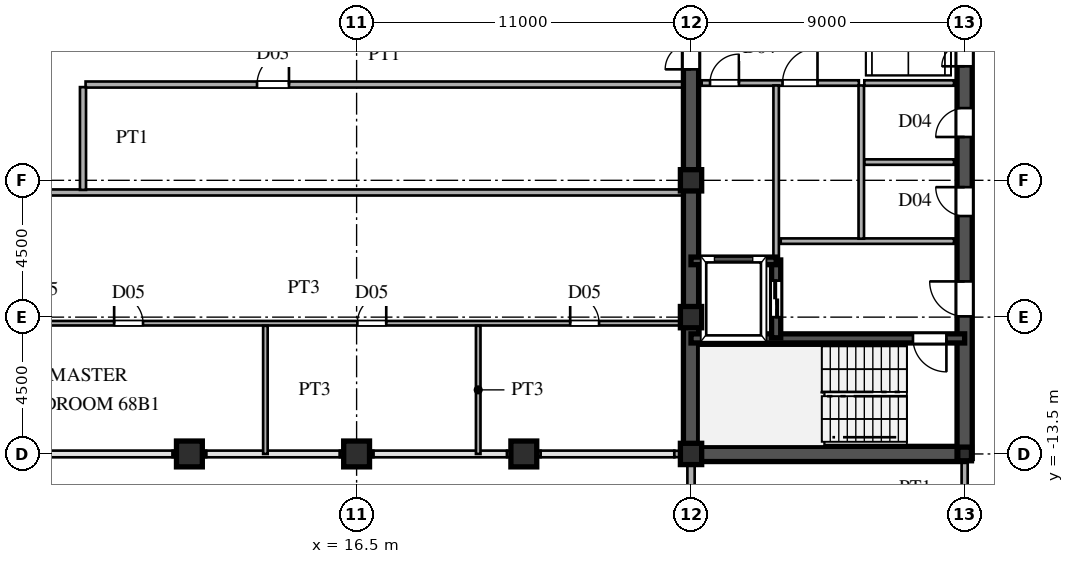
"""IFC4 building model, lengths in metres.
Left out: names, types, materials, properties, quantities, classifications, styles, units other than length and angle.
Written with IfcOpenShell. Run it as: python <this file> out.ifc"""

import sys

from ifc_helpers import new_model, si_unit, direction, frame, frame_2d, origin, origin_2d, place, context, subcontext, project, spatial, rectangle, hollow_rectangle, i_section, extrude, source, transform, mapped, element, fill, save


model = new_model("IFC4")
c1 = context("Model", 3, precision=1e-05, world=origin(), true_north=direction((0.0, 1.0)))
c2 = subcontext(c1, "Body", "Model", "MODEL_VIEW")
j1 = project(units=[si_unit("LENGTHUNIT", "METRE"), si_unit("PLANEANGLEUNIT", "RADIAN")], contexts=[c1])
p1 = place(None, origin())
s1 = spatial("IfcSite", under=j1, at=p1, CompositionType="ELEMENT")
p2 = place(p1, origin())
s2 = spatial("IfcBuilding", under=s1, at=p2, CompositionType="ELEMENT")
p3 = place(p2, frame((0.0, 0.0, 258.15)))
s3 = spatial("IfcBuildingStorey", under=s2, at=p3, CompositionType="ELEMENT", Elevation=258.15)
m1 = source(origin(), c2, "Body", "SweptSolid", [
    extrude(hollow_rectangle(XDim=0.7, YDim=0.7, WallThickness=0.03, at=origin_2d()), origin(), (0.0, 0.0, 1.0), 3.75),
])
for number, where, z_axis, x_axis in (
    (1, (27.5, -13.5, 0.0), (0.0, 0.0, 1.0), (1.0, 0.0, 0.0)),
    (2, (27.5, -9.0, 0.0), (0.0, 0.0, 1.0), (1.0, 0.0, 0.0)),
    (3, (27.5, -4.5, 0.0), (0.0, 0.0, 1.0), (1.0, 0.0, 0.0)),
):
    element("IfcColumn", number, at=place(p3, frame(where, z_axis=z_axis, x_axis=x_axis)), inside=s3, PredefinedType="COLUMN", context=c2, shape_type="MappedRepresentation", body=[
        mapped(m1, transform((0.0, 0.0, 0.0), scale=1.0)),
    ])
m2 = source(origin(), c2, "Body", "SweptSolid", [
    extrude(i_section(OverallWidth=0.45, OverallDepth=0.45, WebThickness=0.016, FlangeThickness=0.025, at=origin_2d()), origin(), (0.0, 0.0, 1.0), 3.75),
])
p4 = place(p3, frame((36.5, -13.5, 0.0), z_axis=(0.0, 0.0, 1.0), x_axis=(1.0, 0.0, 0.0)))
e4 = element("IfcColumn", 4, at=p4, inside=s3, PredefinedType="COLUMN", context=c2, shape_type="MappedRepresentation", body=[
    mapped(m2, transform((0.0, 0.0, 0.0), scale=1.0)),
])
m3 = source(origin(), c2, "Body", "SweptSolid", [
    extrude(hollow_rectangle(XDim=0.85, YDim=0.85, WallThickness=0.036, at=origin_2d()), origin(), (0.0, 0.0, 1.0), 3.75),
])
for number, where, z_axis, x_axis in (
    (5, (11.0, -13.5, 0.0), (0.0, 0.0, 1.0), (1.0, 0.0, 0.0)),
    (6, (16.5, -13.5, 0.0), (0.0, 0.0, 1.0), (1.0, 0.0, 0.0)),
    (7, (22.0, -13.5, 0.0), (0.0, 0.0, 1.0), (1.0, 0.0, 0.0)),
):
    element("IfcColumn", number, at=place(p3, frame(where, z_axis=z_axis, x_axis=x_axis)), inside=s3, PredefinedType="COLUMN", context=c2, shape_type="MappedRepresentation", body=[
        mapped(m3, transform((0.0, 0.0, 0.0), scale=1.0)),
    ])
p5 = place(p3, frame((27.5, -15.98, 0.0), z_axis=(0.0, 0.0, 1.0), x_axis=(0.0, 1.0, 0.0)))
e8 = element("IfcWall", 8, at=p5, inside=s3, PredefinedType="SOLIDWALL", context=c2, shape_type="SweptSolid", body=[
    extrude(rectangle(XDim=1.605, YDim=0.24, at=frame_2d((0.803, 0.0))), origin(), (0.0, 0.0, 1.0), 3.53),
])
p6 = place(p3, frame((27.5, -14.375, 0.0), z_axis=(0.0, 0.0, 1.0), x_axis=(0.0, 1.0, 0.0)))
e9 = element("IfcWall", 9, at=p6, inside=s3, PredefinedType="SOLIDWALL", context=c2, shape_type="SweptSolid", body=[
    extrude(rectangle(XDim=0.62, YDim=0.24, at=frame_2d((0.31, 0.0))), origin(), (0.0, 0.0, 1.0), 3.03),
])
for number, where, z_axis, x_axis in (
    (10, (10.45, -13.5, 0.0), (0.0, 0.0, 1.0), (1.0, 0.0, 0.0)),
    (11, (15.95, -13.5, 0.0), (0.0, 0.0, 1.0), (1.0, 0.0, 0.0)),
    (12, (21.45, -13.5, 0.0), (0.0, 0.0, 1.0), (1.0, 0.0, 0.0)),
):
    element("IfcWall", number, at=place(p3, frame(where, z_axis=z_axis, x_axis=x_axis)), inside=s3, PredefinedType="SOLIDWALL", context=c2, shape_type="SweptSolid", body=[
        extrude(rectangle(XDim=1.1, YDim=0.21, at=frame_2d((0.55, 0.0))), origin(), (0.0, 0.0, 1.0), 3.03),
    ])
p7 = place(p3, frame((26.95, -13.5, 0.0), z_axis=(0.0, 0.0, 1.0), x_axis=(1.0, 0.0, 0.0)))
e13 = element("IfcWall", 13, at=p7, inside=s3, PredefinedType="SOLIDWALL", context=c2, shape_type="SweptSolid", body=[
    extrude(rectangle(XDim=0.54, YDim=0.21, at=frame_2d((0.27, 0.0))), origin(), (0.0, 0.0, 1.0), 3.03),
])
p8 = place(p3, frame((27.5, -13.5, 0.0), z_axis=(0.0, 0.0, 1.0), x_axis=(0.0, 1.0, 0.0)))
e14 = element("IfcWall", 14, at=p8, inside=s3, PredefinedType="SHEAR", context=c2, shape_type="SweptSolid", body=[
    extrude(rectangle(XDim=12.2, YDim=0.5, at=frame_2d((6.1, 0.0))), origin(), (0.0, 0.0, 1.0), 3.53),
])
p9 = place(p3, frame((27.5, -1.3, 0.0), z_axis=(0.0, 0.0, 1.0), x_axis=(0.0, 1.0, 0.0)))
e15 = element("IfcWall", 15, at=p9, inside=s3, PredefinedType="SHEAR", context=c2, shape_type="SweptSolid", body=[
    extrude(rectangle(XDim=2.6, YDim=0.5, at=frame_2d((1.3, 0.0))), origin(), (0.0, 0.0, 1.0), 3.53),
])
p10 = place(p9, frame((0.45, 0.0, 0.0)))
e16 = element("IfcOpeningElement", 16, at=p10, cuts=e15, PredefinedType="OPENING", context=c2, shape_type="SweptSolid", body=[
    extrude(rectangle(XDim=1.7, YDim=2.35, at=frame_2d((0.85, 1.175))), frame((0.0, 0.26, 0.0), z_axis=(0.0, -1.0, 0.0), x_axis=(1.0, 0.0, 0.0)), (0.0, 0.0, 1.0), 0.52),
])
p11 = place(p3, frame((27.5, -13.5, 0.0), z_axis=(0.0, 0.0, 1.0), x_axis=(1.0, 0.0, 0.0)))
e17 = element("IfcWall", 17, at=p11, inside=s3, PredefinedType="SHEAR", context=c2, shape_type="SweptSolid", body=[
    extrude(rectangle(XDim=9.0, YDim=0.5, at=frame_2d((4.5, 0.0))), origin(), (0.0, 0.0, 1.0), 3.53),
])
p12 = place(p3, frame((36.5, -13.65, 0.0), z_axis=(0.0, 0.0, 1.0), x_axis=(0.0, 1.0, 0.0)))
e18 = element("IfcWall", 18, at=p12, inside=s3, PredefinedType="SHEAR", context=c2, shape_type="SweptSolid", body=[
    extrude(rectangle(XDim=7.15, YDim=0.5, at=frame_2d((3.575, 0.0))), origin(), (0.0, 0.0, 1.0), 3.53),
])
p13 = place(p12, frame((4.675, 0.0, 0.0)))
e19 = element("IfcOpeningElement", 19, at=p13, cuts=e18, PredefinedType="OPENING", context=c2, shape_type="SweptSolid", body=[
    extrude(rectangle(XDim=1.15, YDim=2.2, at=frame_2d((0.575, 1.1))), frame((0.0, 0.26, 0.0), z_axis=(0.0, -1.0, 0.0), x_axis=(1.0, 0.0, 0.0)), (0.0, 0.0, 1.0), 0.52),
])
p14 = place(p3, frame((36.5, -1.3, 0.0), z_axis=(0.0, 0.0, 1.0), x_axis=(0.0, 1.0, 0.0)))
e20 = element("IfcWall", 20, at=p14, inside=s3, PredefinedType="SHEAR", context=c2, shape_type="SweptSolid", body=[
    extrude(rectangle(XDim=2.6, YDim=0.5, at=frame_2d((1.3, 0.0))), origin(), (0.0, 0.0, 1.0), 3.53),
])
p15 = place(p14, frame((0.55, 0.0, 0.0)))
e21 = element("IfcOpeningElement", 21, at=p15, cuts=e20, PredefinedType="OPENING", context=c2, shape_type="SweptSolid", body=[
    extrude(rectangle(XDim=1.5, YDim=2.3, at=frame_2d((0.75, 1.15))), frame((0.0, 0.26, 0.0), z_axis=(0.0, -1.0, 0.0), x_axis=(1.0, 0.0, 0.0)), (0.0, 0.0, 1.0), 0.52),
])
p16 = place(p3, frame((36.5, -6.5, 0.0), z_axis=(0.0, 0.0, 1.0), x_axis=(0.0, 1.0, 0.0)))
e22 = element("IfcWall", 22, at=p16, inside=s3, PredefinedType="SHEAR", context=c2, shape_type="SweptSolid", body=[
    extrude(rectangle(XDim=2.6, YDim=0.5, at=frame_2d((1.3, 0.0))), origin(), (0.0, 0.0, 1.0), 3.53),
])
p17 = place(p16, frame((0.825, 0.0, 0.0)))
e23 = element("IfcOpeningElement", 23, at=p17, cuts=e22, PredefinedType="OPENING", context=c2, shape_type="SweptSolid", body=[
    extrude(rectangle(XDim=0.95, YDim=2.15, at=frame_2d((0.475, 1.075))), frame((0.0, 0.26, 0.0), z_axis=(0.0, -1.0, 0.0), x_axis=(1.0, 0.0, 0.0)), (0.0, 0.0, 1.0), 0.52),
])
p18 = place(p3, frame((36.5, -3.9, 0.0), z_axis=(0.0, 0.0, 1.0), x_axis=(0.0, 1.0, 0.0)))
e24 = element("IfcWall", 24, at=p18, inside=s3, PredefinedType="SHEAR", context=c2, shape_type="SweptSolid", body=[
    extrude(rectangle(XDim=2.6, YDim=0.5, at=frame_2d((1.3, 0.0))), origin(), (0.0, 0.0, 1.0), 3.53),
])
p19 = place(p18, frame((0.825, 0.0, 0.0)))
e25 = element("IfcOpeningElement", 25, at=p19, cuts=e24, PredefinedType="OPENING", context=c2, shape_type="SweptSolid", body=[
    extrude(rectangle(XDim=0.95, YDim=2.15, at=frame_2d((0.475, 1.075))), frame((0.0, 0.26, 0.0), z_axis=(0.0, -1.0, 0.0), x_axis=(1.0, 0.0, 0.0)), (0.0, 0.0, 1.0), 0.52),
])
p20 = place(p3, frame((27.5, -9.7, 0.0), z_axis=(0.0, 0.0, 1.0), x_axis=(1.0, 0.0, 0.0)))
e26 = element("IfcWall", 26, at=p20, inside=s3, PredefinedType="SHEAR", context=c2, shape_type="SweptSolid", body=[
    extrude(rectangle(XDim=9.0, YDim=0.3, at=frame_2d((4.5, 0.0))), origin(), (0.0, 0.0, 1.0), 3.53),
])
p21 = place(p20, frame((7.3, 0.0, 0.0)))
e27 = element("IfcOpeningElement", 27, at=p21, cuts=e26, PredefinedType="OPENING", context=c2, shape_type="SweptSolid", body=[
    extrude(rectangle(XDim=1.1, YDim=2.2, at=frame_2d((0.55, 1.1))), frame((0.0, 0.16, 0.0), z_axis=(0.0, -1.0, 0.0), x_axis=(1.0, 0.0, 0.0)), (0.0, 0.0, 1.0), 0.32),
])
p22 = place(p3, frame((27.5, -7.15, 0.0), z_axis=(0.0, 0.0, 1.0), x_axis=(1.0, 0.0, 0.0)))
e28 = element("IfcWall", 28, at=p22, inside=s3, PredefinedType="SHEAR", context=c2, shape_type="SweptSolid", body=[
    extrude(rectangle(XDim=2.8, YDim=0.25, at=frame_2d((1.4, 0.0))), origin(), (0.0, 0.0, 1.0), 3.53),
])
p23 = place(p3, frame((30.3, -9.68, 0.0), z_axis=(0.0, 0.0, 1.0), x_axis=(0.0, 1.0, 0.0)))
e29 = element("IfcWall", 29, at=p23, inside=s3, PredefinedType="SHEAR", context=c2, shape_type="SweptSolid", body=[
    extrude(rectangle(XDim=2.56, YDim=0.3, at=frame_2d((1.28, 0.0))), origin(), (0.0, 0.0, 1.0), 3.53),
])
p24 = place(p23, frame((0.68, 0.0, 0.0)))
e30 = element("IfcOpeningElement", 30, at=p24, cuts=e29, PredefinedType="OPENING", context=c2, shape_type="SweptSolid", body=[
    extrude(rectangle(XDim=1.2, YDim=2.25, at=frame_2d((0.6, 1.125))), frame((0.0, 0.16, 0.0), z_axis=(0.0, -1.0, 0.0), x_axis=(1.0, 0.0, 0.0)), (0.0, 0.0, 1.0), 0.32),
])
p25 = place(p3, frame((30.45, -6.5, 0.0), z_axis=(0.0, 0.0, 1.0), x_axis=(1.0, 0.0, 0.0)))
e31 = element("IfcWall", 31, at=p25, inside=s3, PredefinedType="PARTITIONING", context=c2, shape_type="SweptSolid", body=[
    extrude(rectangle(XDim=5.7, YDim=0.18, at=frame_2d((2.85, 0.0))), origin(), (0.0, 0.0, 1.0), 3.53),
])
p26 = place(p3, frame((33.1, -6.42, 0.0), z_axis=(0.0, 0.0, 1.0), x_axis=(0.0, 1.0, 0.0)))
e32 = element("IfcWall", 32, at=p26, inside=s3, PredefinedType="PARTITIONING", context=c2, shape_type="SweptSolid", body=[
    extrude(rectangle(XDim=5.04, YDim=0.18, at=frame_2d((2.52, 0.0))), origin(), (0.0, 0.0, 1.0), 3.53),
])
p27 = place(p3, frame((27.85, -1.3, 0.0), z_axis=(0.0, 0.0, 1.0), x_axis=(1.0, 0.0, 0.0)))
e33 = element("IfcWall", 33, at=p27, inside=s3, PredefinedType="PARTITIONING", context=c2, shape_type="SweptSolid", body=[
    extrude(rectangle(XDim=2.45, YDim=0.18, at=frame_2d((1.225, 0.0))), origin(), (0.0, 0.0, 1.0), 3.53),
])
p28 = place(p27, frame((0.275, 0.0, 0.0)))
e34 = element("IfcOpeningElement", 34, at=p28, cuts=e33, PredefinedType="OPENING", context=c2, shape_type="SweptSolid", body=[
    extrude(rectangle(XDim=0.95, YDim=2.15, at=frame_2d((0.475, 1.075))), frame((0.0, 0.1, 0.0), z_axis=(0.0, -1.0, 0.0), x_axis=(1.0, 0.0, 0.0)), (0.0, 0.0, 1.0), 0.2),
])
p29 = place(p3, frame((30.3, -1.3, 0.0), z_axis=(0.0, 0.0, 1.0), x_axis=(1.0, 0.0, 0.0)))
e35 = element("IfcWall", 35, at=p29, inside=s3, PredefinedType="PARTITIONING", context=c2, shape_type="SweptSolid", body=[
    extrude(rectangle(XDim=2.72, YDim=0.18, at=frame_2d((1.36, 0.0))), origin(), (0.0, 0.0, 1.0), 3.53),
])
p30 = place(p29, frame((0.21, 0.0, 0.0)))
e36 = element("IfcOpeningElement", 36, at=p30, cuts=e35, PredefinedType="OPENING", context=c2, shape_type="SweptSolid", body=[
    extrude(rectangle(XDim=1.15, YDim=2.2, at=frame_2d((0.575, 1.1))), frame((0.0, 0.1, 0.0), z_axis=(0.0, -1.0, 0.0), x_axis=(1.0, 0.0, 0.0)), (0.0, 0.0, 1.0), 0.2),
])
p31 = place(p3, frame((30.3, -7.12, 0.0), z_axis=(0.0, 0.0, 1.0), x_axis=(0.0, 1.0, 0.0)))
e37 = element("IfcWall", 37, at=p31, inside=s3, PredefinedType="PARTITIONING", context=c2, shape_type="SweptSolid", body=[
    extrude(rectangle(XDim=5.74, YDim=0.18, at=frame_2d((2.87, 0.0))), origin(), (0.0, 0.0, 1.0), 3.53),
])
for number, where, z_axis, x_axis in (
    (38, (33.2, -1.3, 0.0), (0.0, 0.0, 1.0), (1.0, 0.0, 0.0)),
    (39, (33.2, -3.9, 0.0), (0.0, 0.0, 1.0), (1.0, 0.0, 0.0)),
):
    element("IfcWall", number, at=place(p3, frame(where, z_axis=z_axis, x_axis=x_axis)), inside=s3, PredefinedType="PARTITIONING", context=c2, shape_type="SweptSolid", body=[
        extrude(rectangle(XDim=2.95, YDim=0.18, at=frame_2d((1.475, 0.0))), origin(), (0.0, 0.0, 1.0), 3.53),
    ])
p32 = place(p3, frame((4.585, -9.2, 0.0), z_axis=(0.0, 0.0, 1.0), x_axis=(1.0, 0.0, 0.0)))
e40 = element("IfcWall", 40, at=p32, inside=s3, PredefinedType="PARTITIONING", context=c2, shape_type="SweptSolid", body=[
    extrude(rectangle(XDim=22.66, YDim=0.15, at=frame_2d((11.33, 0.0))), origin(), (0.0, 0.0, 1.0), 3.53),
])
p33 = place(p32, frame((3.94, 0.0, 0.0)))
e41 = element("IfcOpeningElement", 41, at=p33, cuts=e40, PredefinedType="OPENING", context=c2, shape_type="SweptSolid", body=[
    extrude(rectangle(XDim=0.95, YDim=2.15, at=frame_2d((0.475, 1.075))), frame((0.0, 0.085, 0.0), z_axis=(0.0, -1.0, 0.0), x_axis=(1.0, 0.0, 0.0)), (0.0, 0.0, 1.0), 0.17),
])
p34 = place(p32, frame((11.94, 0.0, 0.0)))
e42 = element("IfcOpeningElement", 42, at=p34, cuts=e40, PredefinedType="OPENING", context=c2, shape_type="SweptSolid", body=[
    extrude(rectangle(XDim=0.95, YDim=2.15, at=frame_2d((0.475, 1.075))), frame((0.0, 0.085, 0.0), z_axis=(0.0, -1.0, 0.0), x_axis=(1.0, 0.0, 0.0)), (0.0, 0.0, 1.0), 0.17),
])
p35 = place(p32, frame((18.94, 0.0, 0.0)))
e43 = element("IfcOpeningElement", 43, at=p35, cuts=e40, PredefinedType="OPENING", context=c2, shape_type="SweptSolid", body=[
    extrude(rectangle(XDim=0.95, YDim=2.15, at=frame_2d((0.475, 1.075))), frame((0.0, 0.085, 0.0), z_axis=(0.0, -1.0, 0.0), x_axis=(1.0, 0.0, 0.0)), (0.0, 0.0, 1.0), 0.17),
])
p36 = place(p3, frame((-27.245, -4.9, 0.0), z_axis=(0.0, 0.0, 1.0), x_axis=(1.0, 0.0, 0.0)))
e44 = element("IfcWall", 44, at=p36, inside=s3, PredefinedType="PARTITIONING", context=c2, shape_type="SweptSolid", body=[
    extrude(rectangle(XDim=54.49, YDim=0.2, at=frame_2d((27.245, 0.0))), origin(), (0.0, 0.0, 1.0), 3.53),
])
p37 = place(p36, frame((22.47, 0.0, 0.0)))
e45 = element("IfcOpeningElement", 45, at=p37, cuts=e44, PredefinedType="OPENING", context=c2, shape_type="SweptSolid", body=[
    extrude(rectangle(XDim=1.05, YDim=2.25, at=frame_2d((0.525, 1.125))), frame((0.0, 0.11, 0.0), z_axis=(0.0, -1.0, 0.0), x_axis=(1.0, 0.0, 0.0)), (0.0, 0.0, 1.0), 0.22),
])
p38 = place(p3, frame((7.585, -1.35, 0.0), z_axis=(0.0, 0.0, 1.0), x_axis=(1.0, 0.0, 0.0)))
e46 = element("IfcWall", 46, at=p38, inside=s3, PredefinedType="PARTITIONING", context=c2, shape_type="SweptSolid", body=[
    extrude(rectangle(XDim=19.66, YDim=0.2, at=frame_2d((9.83, 0.0))), origin(), (0.0, 0.0, 1.0), 3.53),
])
p39 = place(p38, frame((5.64, 0.0, 0.0)))
e47 = element("IfcOpeningElement", 47, at=p39, cuts=e46, PredefinedType="OPENING", context=c2, shape_type="SweptSolid", body=[
    extrude(rectangle(XDim=1.05, YDim=2.25, at=frame_2d((0.525, 1.125))), frame((0.0, 0.11, 0.0), z_axis=(0.0, -1.0, 0.0), x_axis=(1.0, 0.0, 0.0)), (0.0, 0.0, 1.0), 0.22),
])
p40 = place(p3, frame((7.5, -4.815, 0.0), z_axis=(0.0, 0.0, 1.0), x_axis=(0.0, 1.0, 0.0)))
e48 = element("IfcWall", 48, at=p40, inside=s3, PredefinedType="PARTITIONING", context=c2, shape_type="SweptSolid", body=[
    extrude(rectangle(XDim=3.38, YDim=0.2, at=frame_2d((1.69, 0.0))), origin(), (0.0, 0.0, 1.0), 3.53),
])
for number, where, z_axis, x_axis in (
    (49, (13.5, -13.5, 0.0), (0.0, 0.0, 1.0), (0.0, 1.0, 0.0)),
    (50, (20.5, -13.5, 0.0), (0.0, 0.0, 1.0), (0.0, 1.0, 0.0)),
):
    element("IfcWall", number, at=place(p3, frame(where, z_axis=z_axis, x_axis=x_axis)), inside=s3, PredefinedType="PARTITIONING", context=c2, shape_type="SweptSolid", body=[
        extrude(rectangle(XDim=4.215, YDim=0.15, at=frame_2d((2.107, 0.0))), origin(), (0.0, 0.0, 1.0), 3.53),
    ])
p41 = place(p3, frame((36.5, -15.515, 0.0), z_axis=(0.0, 0.0, 1.0), x_axis=(0.0, 1.0, 0.0)))
e51 = element("IfcWall", 51, at=p41, inside=s3, PredefinedType="PARTITIONING", context=c2, shape_type="SweptSolid", body=[
    extrude(rectangle(XDim=1.76, YDim=0.2, at=frame_2d((0.88, 0.0))), origin(), (0.0, 0.0, 1.0), 2.93),
])
m4 = source(origin(), c2, "Body", "SweptSolid", [
    extrude(rectangle(XDim=1.7, YDim=2.35, at=frame_2d((0.85, 1.175))), frame((0.0, 0.025, 0.0), z_axis=(0.0, -1.0, 0.0), x_axis=(1.0, 0.0, 0.0)), (0.0, 0.0, 1.0), 0.05),
])
p42 = place(p10, origin())
e52 = element("IfcDoor", 52, at=p42, inside=s3, OperationType="DOUBLE_SWING_LEFT", PredefinedType="DOOR", context=c2, shape_type="MappedRepresentation", body=[
    mapped(m4, transform((0.0, 0.0, 0.0), scale=1.0)),
])
fill(e16, e52)
m5 = source(origin(), c2, "Body", "SweptSolid", [
    extrude(rectangle(XDim=1.15, YDim=2.2, at=frame_2d((0.575, 1.1))), frame((0.0, 0.025, 0.0), z_axis=(0.0, -1.0, 0.0), x_axis=(1.0, 0.0, 0.0)), (0.0, 0.0, 1.0), 0.05),
])
p43 = place(p13, origin())
e53 = element("IfcDoor", 53, at=p43, inside=s3, OperationType="SINGLE_SWING_RIGHT", PredefinedType="DOOR", context=c2, shape_type="MappedRepresentation", body=[
    mapped(m5, transform((0.0, 0.0, 0.0), scale=1.0)),
])
fill(e19, e53)
m6 = source(origin(), c2, "Body", "SweptSolid", [
    extrude(rectangle(XDim=1.5, YDim=2.3, at=frame_2d((0.75, 1.15))), frame((0.0, 0.025, 0.0), z_axis=(0.0, -1.0, 0.0), x_axis=(1.0, 0.0, 0.0)), (0.0, 0.0, 1.0), 0.05),
])
p44 = place(p15, origin())
e54 = element("IfcDoor", 54, at=p44, inside=s3, OperationType="DOUBLE_SWING_LEFT", PredefinedType="DOOR", context=c2, shape_type="MappedRepresentation", body=[
    mapped(m6, transform((0.0, 0.0, 0.0), scale=1.0)),
])
fill(e21, e54)
m7 = source(origin(), c2, "Body", "SweptSolid", [
    extrude(rectangle(XDim=0.95, YDim=2.15, at=frame_2d((0.475, 1.075))), frame((0.0, 0.025, 0.0), z_axis=(0.0, -1.0, 0.0), x_axis=(1.0, 0.0, 0.0)), (0.0, 0.0, 1.0), 0.05),
])
p45 = place(p17, origin())
e55 = element("IfcDoor", 55, at=p45, inside=s3, OperationType="SINGLE_SWING_RIGHT", PredefinedType="DOOR", context=c2, shape_type="MappedRepresentation", body=[
    mapped(m7, transform((0.0, 0.0, 0.0), scale=1.0)),
])
fill(e23, e55)
p46 = place(p19, origin())
e56 = element("IfcDoor", 56, at=p46, inside=s3, OperationType="SINGLE_SWING_LEFT", PredefinedType="DOOR", context=c2, shape_type="MappedRepresentation", body=[
    mapped(m7, transform((0.0, 0.0, 0.0), scale=1.0)),
])
fill(e25, e56)
m8 = source(origin(), c2, "Body", "SweptSolid", [
    extrude(rectangle(XDim=1.1, YDim=2.2, at=frame_2d((0.55, 1.1))), frame((0.0, 0.025, 0.0), z_axis=(0.0, -1.0, 0.0), x_axis=(1.0, 0.0, 0.0)), (0.0, 0.0, 1.0), 0.05),
])
p47 = place(p21, frame((1.1, 0.0, 0.0), z_axis=(0.0, 0.0, 1.0), x_axis=(-1.0, 0.0, 0.0)))
e57 = element("IfcDoor", 57, at=p47, inside=s3, OperationType="SINGLE_SWING_RIGHT", PredefinedType="DOOR", context=c2, shape_type="MappedRepresentation", body=[
    mapped(m8, transform((0.0, 0.0, 0.0), scale=1.0)),
])
fill(e27, e57)
m9 = source(origin(), c2, "Body", "SweptSolid", [
    extrude(rectangle(XDim=1.2, YDim=2.25, at=frame_2d((0.6, 1.125))), frame((0.0, 0.025, 0.0), z_axis=(0.0, -1.0, 0.0), x_axis=(1.0, 0.0, 0.0)), (0.0, 0.0, 1.0), 0.05),
])
p48 = place(p24, origin())
e58 = element("IfcDoor", 58, at=p48, inside=s3, OperationType="DOUBLE_DOOR_SLIDING", PredefinedType="DOOR", context=c2, shape_type="MappedRepresentation", body=[
    mapped(m9, transform((0.0, 0.0, 0.0), scale=1.0)),
])
fill(e30, e58)
p49 = place(p28, origin())
e59 = element("IfcDoor", 59, at=p49, inside=s3, OperationType="SINGLE_SWING_RIGHT", PredefinedType="DOOR", context=c2, shape_type="MappedRepresentation", body=[
    mapped(m7, transform((0.0, 0.0, 0.0), scale=1.0)),
])
fill(e34, e59)
p50 = place(p30, origin())
e60 = element("IfcDoor", 60, at=p50, inside=s3, OperationType="SINGLE_SWING_RIGHT", PredefinedType="DOOR", context=c2, shape_type="MappedRepresentation", body=[
    mapped(m5, transform((0.0, 0.0, 0.0), scale=1.0)),
])
fill(e36, e60)
m10 = source(origin(), c2, "Body", "SweptSolid", [
    extrude(rectangle(XDim=0.95, YDim=2.15, at=frame_2d((0.475, 1.075))), frame((0.0, 0.025, 0.0), z_axis=(0.0, -1.0, 0.0), x_axis=(1.0, 0.0, 0.0)), (0.0, 0.0, 1.0), 0.05),
])
p51 = place(p33, origin())
e61 = element("IfcDoor", 61, at=p51, inside=s3, OperationType="SINGLE_SWING_LEFT", PredefinedType="DOOR", context=c2, shape_type="MappedRepresentation", body=[
    mapped(m10, transform((0.0, 0.0, 0.0), scale=1.0)),
])
fill(e41, e61)
p52 = place(p34, origin())
e62 = element("IfcDoor", 62, at=p52, inside=s3, OperationType="SINGLE_SWING_RIGHT", PredefinedType="DOOR", context=c2, shape_type="MappedRepresentation", body=[
    mapped(m10, transform((0.0, 0.0, 0.0), scale=1.0)),
])
fill(e42, e62)
p53 = place(p35, origin())
e63 = element("IfcDoor", 63, at=p53, inside=s3, OperationType="SINGLE_SWING_LEFT", PredefinedType="DOOR", context=c2, shape_type="MappedRepresentation", body=[
    mapped(m10, transform((0.0, 0.0, 0.0), scale=1.0)),
])
fill(e43, e63)
m11 = source(origin(), c2, "Body", "SweptSolid", [
    extrude(rectangle(XDim=1.05, YDim=2.25, at=frame_2d((0.525, 1.125))), frame((0.0, 0.025, 0.0), z_axis=(0.0, -1.0, 0.0), x_axis=(1.0, 0.0, 0.0)), (0.0, 0.0, 1.0), 0.05),
])
p54 = place(p39, origin())
e64 = element("IfcDoor", 64, at=p54, inside=s3, OperationType="SINGLE_SWING_RIGHT", PredefinedType="DOOR", context=c2, shape_type="MappedRepresentation", body=[
    mapped(m11, transform((0.0, 0.0, 0.0), scale=1.0)),
])
fill(e47, e64)
save(model, sys.argv[1])
